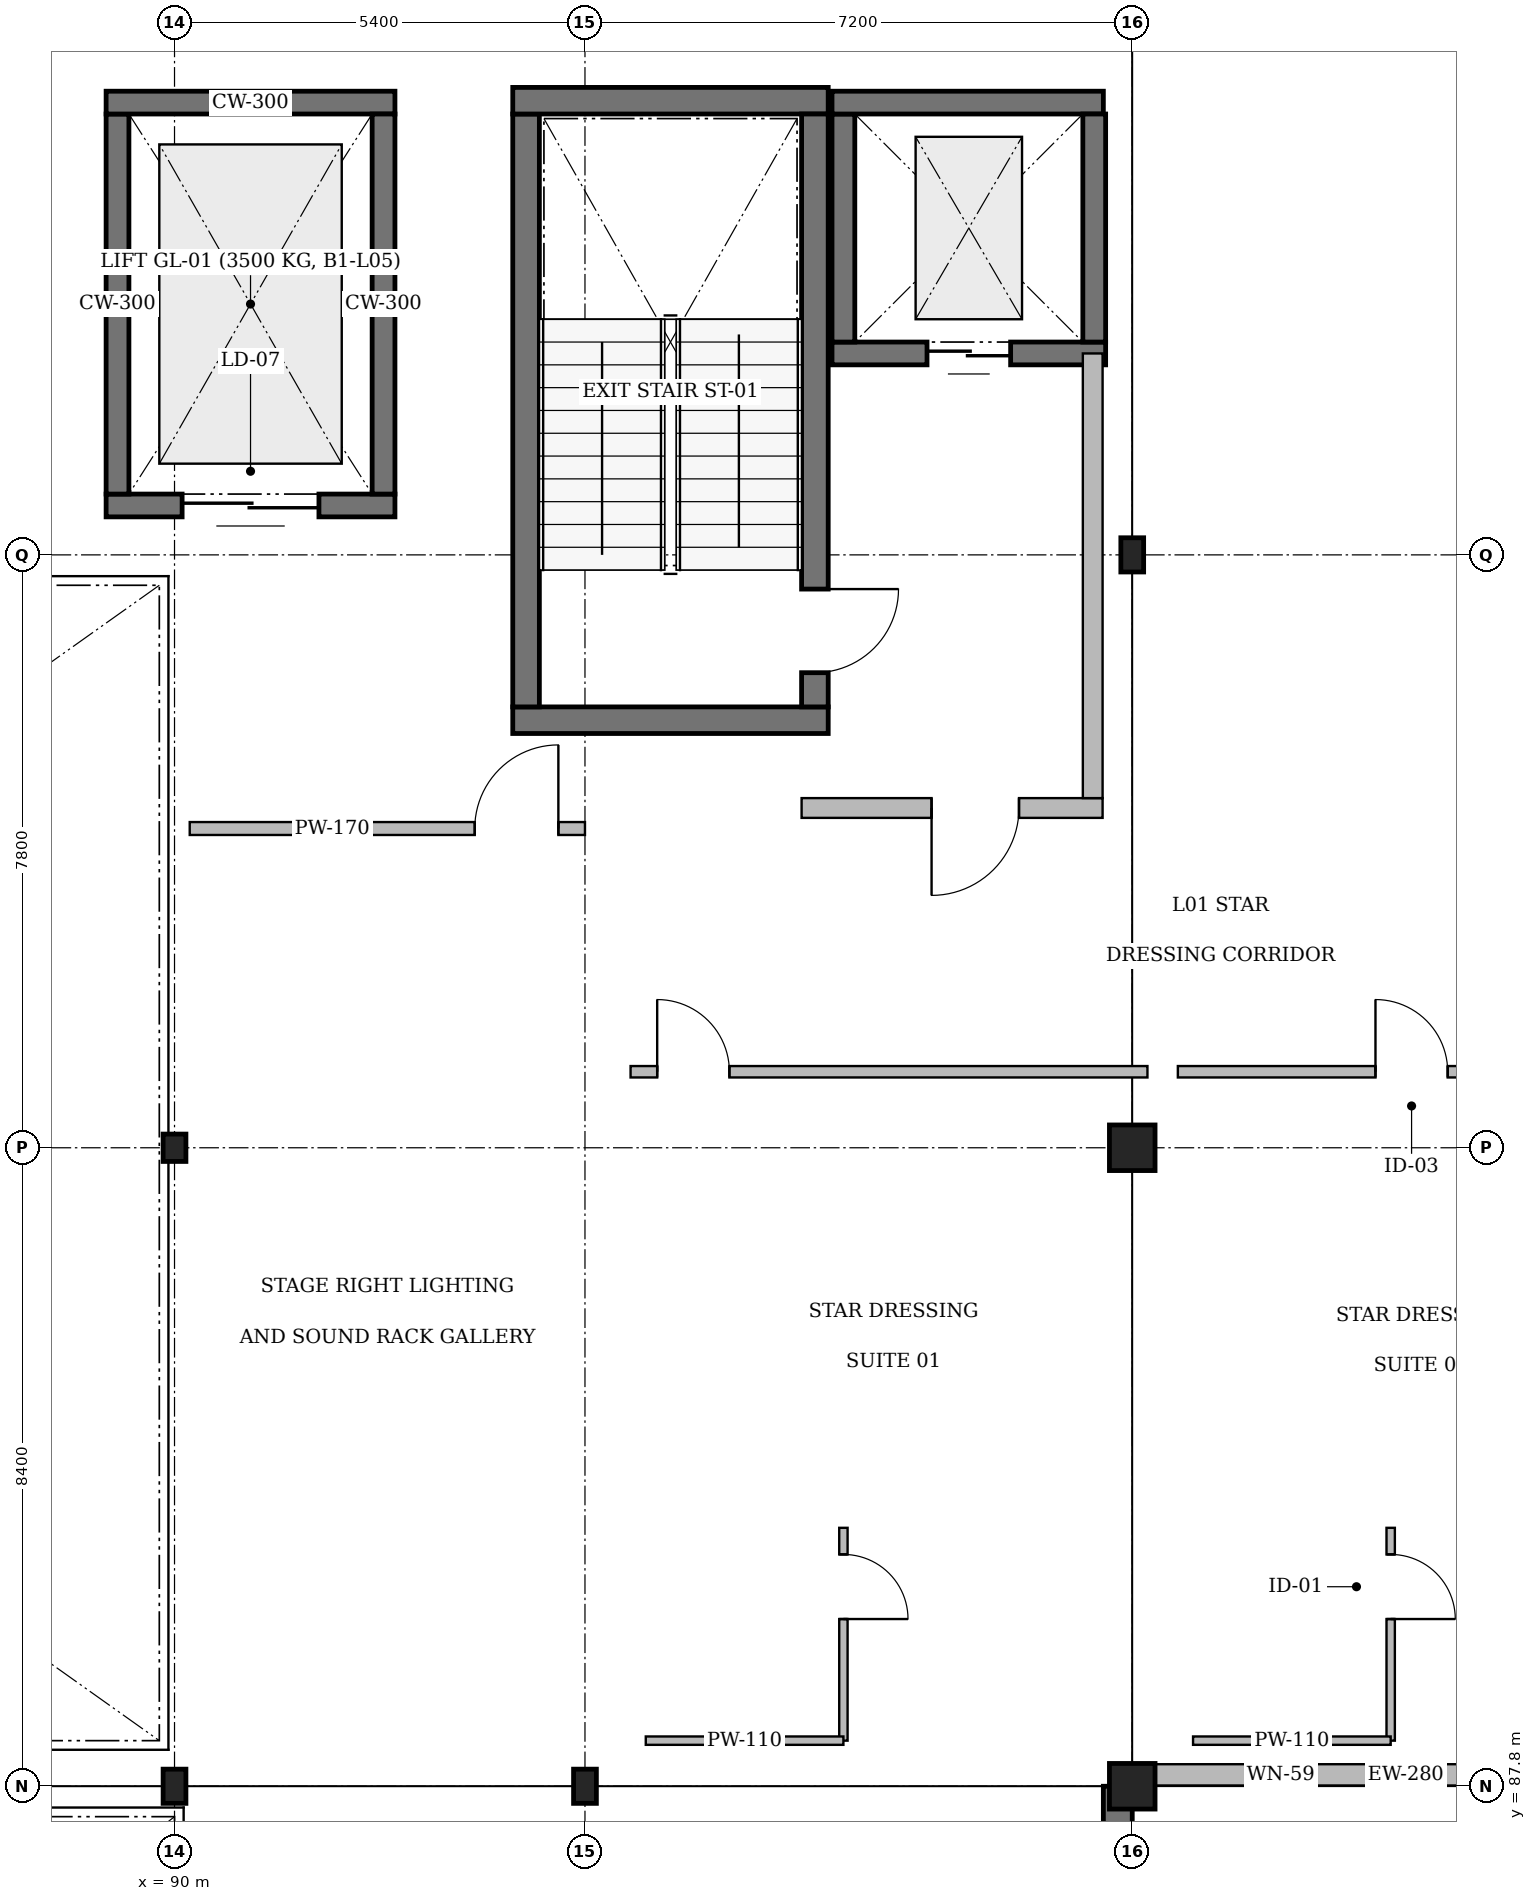
"""IFC4 building model, lengths in metres.
Left out: names, types, materials, properties, quantities, classifications, styles, units other than length and angle.
Written with IfcOpenShell. Run it as: python <this file> out.ifc"""

import sys

from ifc_helpers import new_model, si_unit, direction, frame, frame_2d, origin, origin_2d, place, context, subcontext, project, spatial, rectangle, i_section, extrude, element, fill, save


model = new_model("IFC4")
c1 = context("Model", 3, precision=1e-05, world=origin(), true_north=direction((0.0, 1.0)))
c2 = subcontext(c1, "Body", "Model", "MODEL_VIEW")
j1 = project(units=[si_unit("LENGTHUNIT", "METRE"), si_unit("PLANEANGLEUNIT", "RADIAN")], contexts=[c1])
p1 = place(None, origin())
s1 = spatial("IfcSite", under=j1, at=p1, CompositionType="ELEMENT")
p2 = place(p1, origin())
s2 = spatial("IfcBuilding", under=s1, at=p2, CompositionType="ELEMENT")
p3 = place(p2, frame((0.0, 0.0, 4.8)))
s3 = spatial("IfcBuildingStorey", under=s2, at=p3, CompositionType="ELEMENT", Elevation=4.8)
p4 = place(p3, frame((90.0, 87.8, 0.0), z_axis=(0.0, 0.0, 1.0), x_axis=(1.0, 0.0, 0.0)))
e1 = element("IfcColumn", 1, at=p4, inside=s3, PredefinedType="COLUMN", context=c2, shape_type="SweptSolid", body=[
    extrude(i_section(OverallWidth=0.3, OverallDepth=0.45, WebThickness=0.014, FlangeThickness=0.026, FilletRadius=0.027, at=origin_2d()), origin(), (0.0, 0.0, 1.0), 4.2),
])
p5 = place(p3, frame((90.0, 96.2, 0.0), z_axis=(0.0, 0.0, 1.0), x_axis=(1.0, 0.0, 0.0)))
e2 = element("IfcColumn", 2, at=p5, inside=s3, PredefinedType="COLUMN", context=c2, shape_type="SweptSolid", body=[
    extrude(i_section(OverallWidth=0.3, OverallDepth=0.36, WebThickness=0.012, FlangeThickness=0.022, FilletRadius=0.027, at=origin_2d()), origin(), (0.0, 0.0, 1.0), 4.2),
])
p6 = place(p3, frame((95.4, 87.8, 0.0), z_axis=(0.0, 0.0, 1.0), x_axis=(1.0, 0.0, 0.0)))
e3 = element("IfcColumn", 3, at=p6, inside=s3, PredefinedType="COLUMN", context=c2, shape_type="SweptSolid", body=[
    extrude(i_section(OverallWidth=0.3, OverallDepth=0.45, WebThickness=0.014, FlangeThickness=0.026, FilletRadius=0.027, at=origin_2d()), origin(), (0.0, 0.0, 1.0), 4.2),
])
for number, where, z_axis, x_axis in (
    (4, (102.6, 87.8, 0.0), (0.0, 0.0, 1.0), (1.0, 0.0, 0.0)),
    (5, (102.6, 96.2, 0.0), (0.0, 0.0, 1.0), (1.0, 0.0, 0.0)),
):
    element("IfcColumn", number, at=place(p3, frame(where, z_axis=z_axis, x_axis=x_axis)), inside=s3, PredefinedType="COLUMN", context=c2, shape_type="SweptSolid", body=[
        extrude(rectangle(XDim=0.6, YDim=0.6, at=origin_2d()), origin(), (0.0, 0.0, 1.0), 4.2),
    ])
p7 = place(p3, frame((102.6, 104.0, 0.0), z_axis=(0.0, 0.0, 1.0), x_axis=(1.0, 0.0, 0.0)))
e6 = element("IfcColumn", 6, at=p7, inside=s3, PredefinedType="COLUMN", context=c2, shape_type="SweptSolid", body=[
    extrude(i_section(OverallWidth=0.3, OverallDepth=0.45, WebThickness=0.014, FlangeThickness=0.026, FilletRadius=0.027, at=origin_2d()), origin(), (0.0, 0.0, 1.0), 4.2),
])
p8 = place(p3, frame((98.6, 101.825, 0.0), z_axis=(0.0, 0.0, 1.0), x_axis=(-1.0, 0.0, 0.0)))
e7 = element("IfcWall", 7, at=p8, inside=s3, PredefinedType="SOLIDWALL", context=c2, shape_type="SweptSolid", body=[
    extrude(rectangle(XDim=4.15, YDim=0.35, at=frame_2d((2.075, 0.0))), origin(), (0.0, 0.0, 1.0), 4.2),
])
p9 = place(p3, frame((94.625, 102.0, 0.0), z_axis=(0.0, 0.0, 1.0), x_axis=(0.0, 1.0, 0.0)))
e8 = element("IfcWall", 8, at=p9, inside=s3, PredefinedType="SOLIDWALL", context=c2, shape_type="SweptSolid", body=[
    extrude(rectangle(XDim=7.8, YDim=0.35, at=frame_2d((3.9, 0.0))), origin(), (0.0, 0.0, 1.0), 4.2),
])
p10 = place(p3, frame((94.45, 109.975, 0.0), z_axis=(0.0, 0.0, 1.0), x_axis=(1.0, 0.0, 0.0)))
e9 = element("IfcWall", 9, at=p10, inside=s3, PredefinedType="SOLIDWALL", context=c2, shape_type="SweptSolid", body=[
    extrude(rectangle(XDim=4.15, YDim=0.35, at=frame_2d((2.075, 0.0))), origin(), (0.0, 0.0, 1.0), 4.2),
])
p11 = place(p3, frame((98.425, 109.8, 0.0), z_axis=(0.0, 0.0, 1.0), x_axis=(0.0, -1.0, 0.0)))
e10 = element("IfcWall", 10, at=p11, inside=s3, PredefinedType="SOLIDWALL", context=c2, shape_type="SweptSolid", body=[
    extrude(rectangle(XDim=7.8, YDim=0.35, at=frame_2d((3.9, 0.0))), origin(), (0.0, 0.0, 1.0), 4.2),
])
p12 = place(p11, frame((6.25, 0.0, 0.0)))
e11 = element("IfcOpeningElement", 11, at=p12, cuts=e10, PredefinedType="OPENING", context=c2, shape_type="SweptSolid", body=[
    extrude(rectangle(XDim=1.1, YDim=2.15, at=frame_2d((0.55, 1.075))), frame((0.0, 0.195, 0.0), z_axis=(0.0, -1.0, 0.0), x_axis=(1.0, 0.0, 0.0)), (0.0, 0.0, 1.0), 0.39),
])
p13 = place(p3, frame((102.25, 106.65, 0.0), z_axis=(0.0, 0.0, 1.0), x_axis=(-1.0, 0.0, 0.0)))
e12 = element("IfcWall", 12, at=p13, inside=s3, PredefinedType="SOLIDWALL", context=c2, shape_type="SweptSolid", body=[
    extrude(rectangle(XDim=3.6, YDim=0.3, at=frame_2d((1.8, 0.0))), origin(), (0.0, 0.0, 1.0), 4.2),
])
p14 = place(p13, frame((1.25, 0.0, 0.0)))
e13 = element("IfcOpeningElement", 13, at=p14, cuts=e12, PredefinedType="OPENING", context=c2, shape_type="SweptSolid", body=[
    extrude(rectangle(XDim=1.1, YDim=2.1, at=frame_2d((0.55, 1.05))), frame((0.0, 0.17, 0.0), z_axis=(0.0, -1.0, 0.0), x_axis=(1.0, 0.0, 0.0)), (0.0, 0.0, 1.0), 0.34),
])
p15 = place(p3, frame((98.8, 106.8, 0.0), z_axis=(0.0, 0.0, 1.0), x_axis=(0.0, 1.0, 0.0)))
e14 = element("IfcWall", 14, at=p15, inside=s3, PredefinedType="SOLIDWALL", context=c2, shape_type="SweptSolid", body=[
    extrude(rectangle(XDim=3.0, YDim=0.3, at=frame_2d((1.5, 0.0))), origin(), (0.0, 0.0, 1.0), 4.2),
])
p16 = place(p3, frame((98.65, 109.95, 0.0), z_axis=(0.0, 0.0, 1.0), x_axis=(1.0, 0.0, 0.0)))
e15 = element("IfcWall", 15, at=p16, inside=s3, PredefinedType="SOLIDWALL", context=c2, shape_type="SweptSolid", body=[
    extrude(rectangle(XDim=3.57, YDim=0.3, at=frame_2d((1.785, 0.0))), origin(), (0.0, 0.0, 1.0), 4.2),
])
p17 = place(p3, frame((102.1, 109.8, 0.0), z_axis=(0.0, 0.0, 1.0), x_axis=(0.0, -1.0, 0.0)))
e16 = element("IfcWall", 16, at=p17, inside=s3, PredefinedType="SOLIDWALL", context=c2, shape_type="SweptSolid", body=[
    extrude(rectangle(XDim=3.0, YDim=0.3, at=frame_2d((1.5, 0.0))), origin(), (0.0, 0.0, 1.0), 4.2),
])
p18 = place(p3, frame((102.21, 100.67, 0.0), z_axis=(0.0, 0.0, 1.0), x_axis=(-1.0, 0.0, 0.0)))
e17 = element("IfcWall", 17, at=p18, inside=s3, PredefinedType="SOLIDWALL", context=c2, shape_type="SweptSolid", body=[
    extrude(rectangle(XDim=3.96, YDim=0.26, at=frame_2d((1.98, 0.0))), origin(), (0.0, 0.0, 1.0), 3.94),
])
p19 = place(p18, frame((1.1, 0.0, 0.0)))
e18 = element("IfcOpeningElement", 18, at=p19, cuts=e17, PredefinedType="OPENING", context=c2, shape_type="SweptSolid", body=[
    extrude(rectangle(XDim=1.15, YDim=2.2, at=frame_2d((0.575, 1.1))), frame((0.0, 0.15, 0.0), z_axis=(0.0, -1.0, 0.0), x_axis=(1.0, 0.0, 0.0)), (0.0, 0.0, 1.0), 0.3),
])
p20 = place(p3, frame((102.08, 106.65, 0.0), z_axis=(0.0, 0.0, 1.0), x_axis=(0.0, -1.0, 0.0)))
e19 = element("IfcWall", 19, at=p20, inside=s3, PredefinedType="SOLIDWALL", context=c2, shape_type="SweptSolid", body=[
    extrude(rectangle(XDim=5.85, YDim=0.26, at=frame_2d((2.925, 0.0))), origin(), (0.0, 0.0, 1.0), 3.94),
])
p21 = place(p3, frame((92.9, 104.65, 0.0), z_axis=(0.0, 0.0, 1.0), x_axis=(-1.0, 0.0, 0.0)))
e20 = element("IfcWall", 20, at=p21, inside=s3, PredefinedType="SOLIDWALL", context=c2, shape_type="SweptSolid", body=[
    extrude(rectangle(XDim=3.8, YDim=0.3, at=frame_2d((1.9, 0.0))), origin(), (0.0, 0.0, 1.0), 4.2),
])
p22 = place(p21, frame((1.0, 0.0, 0.0)))
e21 = element("IfcOpeningElement", 21, at=p22, cuts=e20, PredefinedType="OPENING", context=c2, shape_type="SweptSolid", body=[
    extrude(rectangle(XDim=1.8, YDim=2.4, at=frame_2d((0.9, 1.2))), frame((0.0, 0.17, 0.0), z_axis=(0.0, -1.0, 0.0), x_axis=(1.0, 0.0, 0.0)), (0.0, 0.0, 1.0), 0.34),
])
p23 = place(p3, frame((89.25, 104.8, 0.0), z_axis=(0.0, 0.0, 1.0), x_axis=(0.0, 1.0, 0.0)))
e22 = element("IfcWall", 22, at=p23, inside=s3, PredefinedType="SOLIDWALL", context=c2, shape_type="SweptSolid", body=[
    extrude(rectangle(XDim=5.0, YDim=0.3, at=frame_2d((2.5, 0.0))), origin(), (0.0, 0.0, 1.0), 4.2),
])
p24 = place(p3, frame((89.1, 109.95, 0.0), z_axis=(0.0, 0.0, 1.0), x_axis=(1.0, 0.0, 0.0)))
e23 = element("IfcWall", 23, at=p24, inside=s3, PredefinedType="SOLIDWALL", context=c2, shape_type="SweptSolid", body=[
    extrude(rectangle(XDim=3.8, YDim=0.3, at=frame_2d((1.9, 0.0))), origin(), (0.0, 0.0, 1.0), 4.2),
])
p25 = place(p3, frame((92.75, 109.8, 0.0), z_axis=(0.0, 0.0, 1.0), x_axis=(0.0, -1.0, 0.0)))
e24 = element("IfcWall", 24, at=p25, inside=s3, PredefinedType="SOLIDWALL", context=c2, shape_type="SweptSolid", body=[
    extrude(rectangle(XDim=5.0, YDim=0.3, at=frame_2d((2.5, 0.0))), origin(), (0.0, 0.0, 1.0), 4.2),
])
p26 = place(p3, frame((102.41, 87.8, 0.0), z_axis=(0.0, 0.0, 1.0), x_axis=(0.0, -1.0, 0.0)))
e25 = element("IfcWall", 25, at=p26, inside=s3, PredefinedType="SOLIDWALL", context=c2, shape_type="SweptSolid", body=[
    extrude(rectangle(XDim=36.0, YDim=0.38, at=frame_2d((18.0, 0.0))), origin(), (0.0, 0.0, 1.0), 3.94),
])
p27 = place(p3, frame((102.905, 87.95, 0.0), z_axis=(0.0, 0.0, 1.0), x_axis=(1.0, 0.0, 0.0)))
e26 = element("IfcWall", 26, at=p27, inside=s3, PredefinedType="SOLIDWALL", context=c2, shape_type="SweptSolid", body=[
    extrude(rectangle(XDim=6.59, YDim=0.28, at=frame_2d((3.295, 0.0))), origin(), (0.0, 0.0, 1.0), 3.273),
])
p28 = place(p27, frame((1.183, 0.0, 0.95)))
e27 = element("IfcOpeningElement", 27, at=p28, cuts=e26, PredefinedType="OPENING", context=c2, shape_type="SweptSolid", body=[
    extrude(rectangle(XDim=0.93, YDim=1.8, at=frame_2d((0.465, 0.9))), frame((0.0, 0.16, 0.0), z_axis=(0.0, -1.0, 0.0), x_axis=(1.0, 0.0, 0.0)), (0.0, 0.0, 1.0), 0.32),
])
p29 = place(p27, frame((4.478, 0.0, 0.95)))
e28 = element("IfcOpeningElement", 28, at=p29, cuts=e26, PredefinedType="OPENING", context=c2, shape_type="SweptSolid", body=[
    extrude(rectangle(XDim=0.93, YDim=1.8, at=frame_2d((0.465, 0.9))), frame((0.0, 0.16, 0.0), z_axis=(0.0, -1.0, 0.0), x_axis=(1.0, 0.0, 0.0)), (0.0, 0.0, 1.0), 0.32),
])
p30 = place(p3, frame((98.8, 91.2, 0.0), z_axis=(0.0, 0.0, 1.0), x_axis=(0.0, -1.0, 0.0)))
e29 = element("IfcWall", 29, at=p30, inside=s3, PredefinedType="PARTITIONING", context=c2, shape_type="SweptSolid", body=[
    extrude(rectangle(XDim=2.8, YDim=0.11, at=frame_2d((1.4, 0.0))), origin(), (0.0, 0.0, 1.0), 3.94),
])
p31 = place(p30, frame((0.35, 0.0, 0.0)))
e30 = element("IfcOpeningElement", 30, at=p31, cuts=e29, PredefinedType="OPENING", context=c2, shape_type="SweptSolid", body=[
    extrude(rectangle(XDim=0.85, YDim=2.1, at=frame_2d((0.425, 1.05))), frame((0.0, 0.075, 0.0), z_axis=(0.0, -1.0, 0.0), x_axis=(1.0, 0.0, 0.0)), (0.0, 0.0, 1.0), 0.15),
])
p32 = place(p3, frame((98.8, 88.4, 0.0), z_axis=(0.0, 0.0, 1.0), x_axis=(-1.0, 0.0, 0.0)))
e31 = element("IfcWall", 31, at=p32, inside=s3, PredefinedType="PARTITIONING", context=c2, shape_type="SweptSolid", body=[
    extrude(rectangle(XDim=2.6, YDim=0.11, at=frame_2d((1.3, 0.0))), origin(), (0.0, 0.0, 1.0), 3.94),
])
p33 = place(p3, frame((96.0, 97.2, 0.0), z_axis=(0.0, 0.0, 1.0), x_axis=(1.0, 0.0, 0.0)))
e32 = element("IfcWall", 32, at=p33, inside=s3, PredefinedType="PARTITIONING", context=c2, shape_type="SweptSolid", body=[
    extrude(rectangle(XDim=6.8, YDim=0.15, at=frame_2d((3.4, 0.0))), origin(), (0.0, 0.0, 1.0), 3.94),
])
p34 = place(p33, frame((0.35, 0.0, 0.0)))
e33 = element("IfcOpeningElement", 33, at=p34, cuts=e32, PredefinedType="OPENING", context=c2, shape_type="SweptSolid", body=[
    extrude(rectangle(XDim=0.95, YDim=2.2, at=frame_2d((0.475, 1.1))), frame((0.0, 0.095, 0.0), z_axis=(0.0, -1.0, 0.0), x_axis=(1.0, 0.0, 0.0)), (0.0, 0.0, 1.0), 0.19),
])
p35 = place(p3, frame((106.0, 91.2, 0.0), z_axis=(0.0, 0.0, 1.0), x_axis=(0.0, -1.0, 0.0)))
e34 = element("IfcWall", 34, at=p35, inside=s3, PredefinedType="PARTITIONING", context=c2, shape_type="SweptSolid", body=[
    extrude(rectangle(XDim=2.8, YDim=0.11, at=frame_2d((1.4, 0.0))), origin(), (0.0, 0.0, 1.0), 3.94),
])
p36 = place(p35, frame((0.35, 0.0, 0.0)))
e35 = element("IfcOpeningElement", 35, at=p36, cuts=e34, PredefinedType="OPENING", context=c2, shape_type="SweptSolid", body=[
    extrude(rectangle(XDim=0.85, YDim=2.1, at=frame_2d((0.425, 1.05))), frame((0.0, 0.075, 0.0), z_axis=(0.0, -1.0, 0.0), x_axis=(1.0, 0.0, 0.0)), (0.0, 0.0, 1.0), 0.15),
])
p37 = place(p3, frame((106.0, 88.4, 0.0), z_axis=(0.0, 0.0, 1.0), x_axis=(-1.0, 0.0, 0.0)))
e36 = element("IfcWall", 36, at=p37, inside=s3, PredefinedType="PARTITIONING", context=c2, shape_type="SweptSolid", body=[
    extrude(rectangle(XDim=2.6, YDim=0.11, at=frame_2d((1.3, 0.0))), origin(), (0.0, 0.0, 1.0), 3.94),
])
p38 = place(p3, frame((103.2, 97.2, 0.0), z_axis=(0.0, 0.0, 1.0), x_axis=(1.0, 0.0, 0.0)))
e37 = element("IfcWall", 37, at=p38, inside=s3, PredefinedType="PARTITIONING", context=c2, shape_type="SweptSolid", body=[
    extrude(rectangle(XDim=6.4, YDim=0.15, at=frame_2d((3.2, 0.0))), origin(), (0.0, 0.0, 1.0), 3.94),
])
p39 = place(p38, frame((2.6, 0.0, 0.0)))
e38 = element("IfcOpeningElement", 38, at=p39, cuts=e37, PredefinedType="OPENING", context=c2, shape_type="SweptSolid", body=[
    extrude(rectangle(XDim=0.95, YDim=2.2, at=frame_2d((0.475, 1.1))), frame((0.0, 0.095, 0.0), z_axis=(0.0, -1.0, 0.0), x_axis=(1.0, 0.0, 0.0)), (0.0, 0.0, 1.0), 0.19),
])
p40 = place(p3, frame((90.2, 100.4, 0.0), z_axis=(0.0, 0.0, 1.0), x_axis=(1.0, 0.0, 0.0)))
e39 = element("IfcWall", 39, at=p40, inside=s3, PredefinedType="PARTITIONING", context=c2, shape_type="SweptSolid", body=[
    extrude(rectangle(XDim=5.2, YDim=0.17, at=frame_2d((2.6, 0.0))), origin(), (0.0, 0.0, 1.0), 3.94),
])
p41 = place(p40, frame((3.75, 0.0, 0.0)))
e40 = element("IfcOpeningElement", 40, at=p41, cuts=e39, PredefinedType="OPENING", context=c2, shape_type="SweptSolid", body=[
    extrude(rectangle(XDim=1.1, YDim=2.1, at=frame_2d((0.55, 1.05))), frame((0.0, 0.105, 0.0), z_axis=(0.0, -1.0, 0.0), x_axis=(1.0, 0.0, 0.0)), (0.0, 0.0, 1.0), 0.21),
])
p42 = place(p12, origin())
e41 = element("IfcDoor", 41, at=p42, inside=s3, OperationType="SINGLE_SWING_LEFT", PredefinedType="DOOR", context=c2, shape_type="SweptSolid", body=[
    extrude(rectangle(XDim=1.1, YDim=2.15, at=frame_2d((0.55, 1.075))), frame((0.0, 0.025, 0.0), z_axis=(0.0, -1.0, 0.0), x_axis=(1.0, 0.0, 0.0)), (0.0, 0.0, 1.0), 0.05),
])
fill(e11, e41)
p43 = place(p14, origin())
e42 = element("IfcDoor", 42, at=p43, inside=s3, OperationType="DOUBLE_DOOR_SLIDING", PredefinedType="DOOR", context=c2, shape_type="SweptSolid", body=[
    extrude(rectangle(XDim=1.1, YDim=2.1, at=frame_2d((0.55, 1.05))), frame((0.0, 0.025, 0.0), z_axis=(0.0, -1.0, 0.0), x_axis=(1.0, 0.0, 0.0)), (0.0, 0.0, 1.0), 0.05),
])
fill(e13, e42)
p44 = place(p19, origin())
e43 = element("IfcDoor", 43, at=p44, inside=s3, OperationType="SINGLE_SWING_RIGHT", PredefinedType="DOOR", context=c2, shape_type="SweptSolid", body=[
    extrude(rectangle(XDim=1.15, YDim=2.2, at=frame_2d((0.575, 1.1))), frame((0.0, 0.025, 0.0), z_axis=(0.0, -1.0, 0.0), x_axis=(1.0, 0.0, 0.0)), (0.0, 0.0, 1.0), 0.05),
])
fill(e18, e43)
p45 = place(p22, origin())
e44 = element("IfcDoor", 44, at=p45, inside=s3, OperationType="DOUBLE_DOOR_SLIDING", PredefinedType="DOOR", context=c2, shape_type="SweptSolid", body=[
    extrude(rectangle(XDim=1.8, YDim=2.4, at=frame_2d((0.9, 1.2))), frame((0.0, 0.025, 0.0), z_axis=(0.0, -1.0, 0.0), x_axis=(1.0, 0.0, 0.0)), (0.0, 0.0, 1.0), 0.05),
])
fill(e21, e44)
p46 = place(p28, origin())
e45 = element("IfcWindow", 45, at=p46, inside=s3, PartitioningType="SINGLE_PANEL", PredefinedType="WINDOW", context=c2, shape_type="SweptSolid", body=[
    extrude(rectangle(XDim=0.93, YDim=1.8, at=frame_2d((0.465, 0.9))), frame((0.0, 0.03, 0.0), z_axis=(0.0, -1.0, 0.0), x_axis=(1.0, 0.0, 0.0)), (0.0, 0.0, 1.0), 0.06),
])
fill(e27, e45)
p47 = place(p31, origin())
e46 = element("IfcDoor", 46, at=p47, inside=s3, OperationType="SINGLE_SWING_RIGHT", PredefinedType="DOOR", context=c2, shape_type="SweptSolid", body=[
    extrude(rectangle(XDim=0.85, YDim=2.1, at=frame_2d((0.425, 1.05))), frame((0.0, 0.025, 0.0), z_axis=(0.0, -1.0, 0.0), x_axis=(1.0, 0.0, 0.0)), (0.0, 0.0, 1.0), 0.05),
])
fill(e30, e46)
p48 = place(p34, origin())
e47 = element("IfcDoor", 47, at=p48, inside=s3, OperationType="SINGLE_SWING_LEFT", PredefinedType="DOOR", context=c2, shape_type="SweptSolid", body=[
    extrude(rectangle(XDim=0.95, YDim=2.2, at=frame_2d((0.475, 1.1))), frame((0.0, 0.025, 0.0), z_axis=(0.0, -1.0, 0.0), x_axis=(1.0, 0.0, 0.0)), (0.0, 0.0, 1.0), 0.05),
])
fill(e33, e47)
p49 = place(p36, origin())
e48 = element("IfcDoor", 48, at=p49, inside=s3, OperationType="SINGLE_SWING_RIGHT", PredefinedType="DOOR", context=c2, shape_type="SweptSolid", body=[
    extrude(rectangle(XDim=0.85, YDim=2.1, at=frame_2d((0.425, 1.05))), frame((0.0, 0.025, 0.0), z_axis=(0.0, -1.0, 0.0), x_axis=(1.0, 0.0, 0.0)), (0.0, 0.0, 1.0), 0.05),
])
fill(e35, e48)
p50 = place(p39, origin())
e49 = element("IfcDoor", 49, at=p50, inside=s3, OperationType="SINGLE_SWING_LEFT", PredefinedType="DOOR", context=c2, shape_type="SweptSolid", body=[
    extrude(rectangle(XDim=0.95, YDim=2.2, at=frame_2d((0.475, 1.1))), frame((0.0, 0.025, 0.0), z_axis=(0.0, -1.0, 0.0), x_axis=(1.0, 0.0, 0.0)), (0.0, 0.0, 1.0), 0.05),
])
fill(e38, e49)
p51 = place(p41, origin())
e50 = element("IfcDoor", 50, at=p51, inside=s3, OperationType="SINGLE_SWING_RIGHT", PredefinedType="DOOR", context=c2, shape_type="SweptSolid", body=[
    extrude(rectangle(XDim=1.1, YDim=2.1, at=frame_2d((0.55, 1.05))), frame((0.0, 0.025, 0.0), z_axis=(0.0, -1.0, 0.0), x_axis=(1.0, 0.0, 0.0)), (0.0, 0.0, 1.0), 0.05),
])
fill(e40, e50)
save(model, sys.argv[1])
